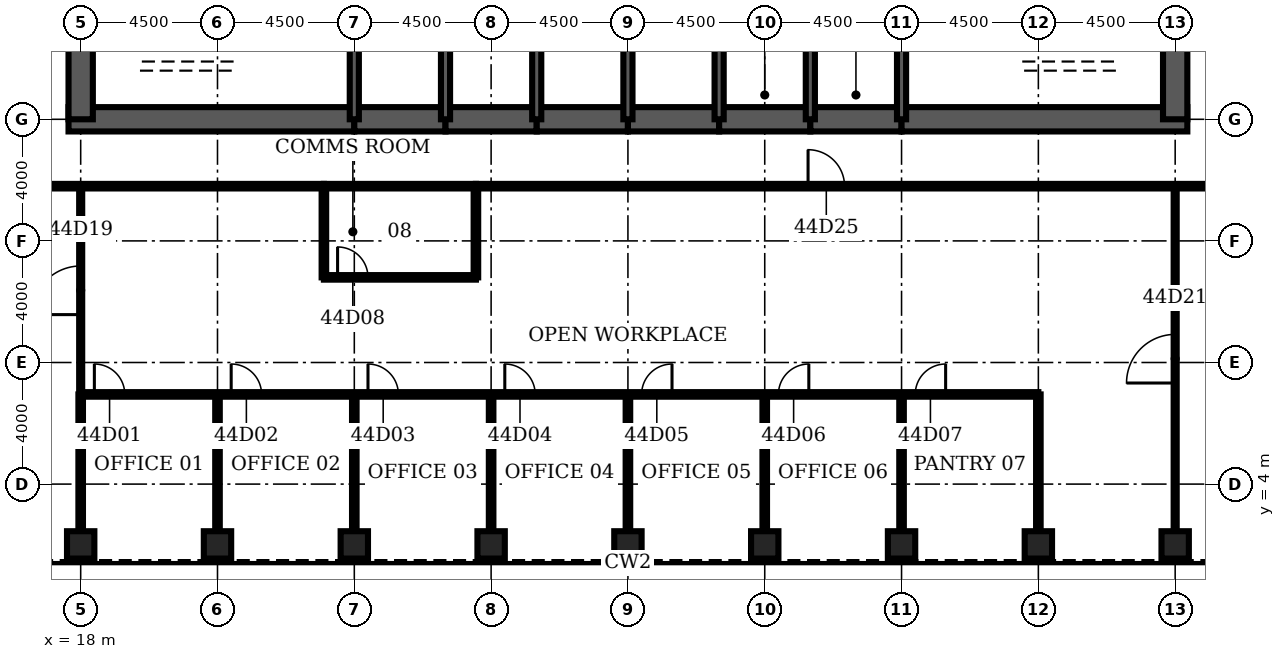
"""IFC4 building model, lengths in metres.
Left out: names, types, materials, properties, quantities, classifications, styles, units other than length and angle.
Written with IfcOpenShell. Run it as: python <this file> out.ifc"""

import sys

from ifc_helpers import new_model, si_unit, direction, frame, frame_2d, origin, origin_2d, place, context, subcontext, project, spatial, rectangle, hollow_rectangle, extrude, element, fill, save


model = new_model("IFC4")
c1 = context("Model", 3, precision=1e-05, world=origin(), true_north=direction((0.0, 1.0)))
c2 = subcontext(c1, "Body", "Model", "MODEL_VIEW")
j1 = project(units=[si_unit("LENGTHUNIT", "METRE"), si_unit("PLANEANGLEUNIT", "RADIAN")], contexts=[c1])
p1 = place(None, origin())
s1 = spatial("IfcSite", under=j1, at=p1, CompositionType="ELEMENT")
p2 = place(p1, origin())
s2 = spatial("IfcBuilding", under=s1, at=p2, CompositionType="ELEMENT")
p3 = place(p2, frame((0.0, 0.0, 198.4)))
s3 = spatial("IfcBuildingStorey", under=s2, at=p3, CompositionType="ELEMENT", Elevation=198.4)
for number, where, z_axis, x_axis in (
    (1, (18.0, 2.0, 0.0), (0.0, 0.0, 1.0), (0.0, 1.0, 0.0)),
    (2, (22.5, 2.0, 0.0), (0.0, 0.0, 1.0), (0.0, 1.0, 0.0)),
    (3, (27.0, 2.0, 0.0), (0.0, 0.0, 1.0), (0.0, 1.0, 0.0)),
    (4, (31.5, 2.0, 0.0), (0.0, 0.0, 1.0), (0.0, 1.0, 0.0)),
    (5, (36.0, 2.0, 0.0), (0.0, 0.0, 1.0), (0.0, 1.0, 0.0)),
    (6, (40.5, 2.0, 0.0), (0.0, 0.0, 1.0), (0.0, 1.0, 0.0)),
    (7, (45.0, 2.0, 0.0), (0.0, 0.0, 1.0), (0.0, 1.0, 0.0)),
    (8, (49.5, 2.0, 0.0), (0.0, 0.0, 1.0), (0.0, 1.0, 0.0)),
    (9, (54.0, 2.0, 0.0), (0.0, 0.0, 1.0), (0.0, 1.0, 0.0)),
):
    element("IfcColumn", number, at=place(p3, frame(where, z_axis=z_axis, x_axis=x_axis)), inside=s3, PredefinedType="COLUMN", context=c2, shape_type="SweptSolid", body=[
        extrude(hollow_rectangle(XDim=0.9, YDim=0.9, WallThickness=0.09, at=origin_2d()), origin(), (0.0, 0.0, 1.0), 4.2),
    ])
p4 = place(p3, frame((17.6, 16.0, 0.0), z_axis=(0.0, 0.0, 1.0), x_axis=(1.0, 0.0, 0.0)))
e10 = element("IfcWall", 10, at=p4, inside=s3, PredefinedType="SHEAR", context=c2, shape_type="SweptSolid", body=[
    extrude(rectangle(XDim=9.4, YDim=0.8, at=frame_2d((4.7, 0.0))), origin(), (0.0, 0.0, 1.0), 4.2),
])
for number, where, z_axis, x_axis in (
    (11, (27.0, 16.0, 0.0), (0.0, 0.0, 1.0), (1.0, 0.0, 0.0)),
    (12, (30.0, 16.0, 0.0), (0.0, 0.0, 1.0), (1.0, 0.0, 0.0)),
    (13, (33.0, 16.0, 0.0), (0.0, 0.0, 1.0), (1.0, 0.0, 0.0)),
    (14, (36.0, 16.0, 0.0), (0.0, 0.0, 1.0), (1.0, 0.0, 0.0)),
    (15, (39.0, 16.0, 0.0), (0.0, 0.0, 1.0), (1.0, 0.0, 0.0)),
    (16, (42.0, 16.0, 0.0), (0.0, 0.0, 1.0), (1.0, 0.0, 0.0)),
):
    element("IfcWall", number, at=place(p3, frame(where, z_axis=z_axis, x_axis=x_axis)), inside=s3, PredefinedType="SHEAR", context=c2, shape_type="SweptSolid", body=[
        extrude(rectangle(XDim=3.0, YDim=0.8, at=frame_2d((1.5, 0.0))), origin(), (0.0, 0.0, 1.0), 4.2),
    ])
p5 = place(p3, frame((45.0, 16.0, 0.0), z_axis=(0.0, 0.0, 1.0), x_axis=(1.0, 0.0, 0.0)))
e17 = element("IfcWall", 17, at=p5, inside=s3, PredefinedType="SHEAR", context=c2, shape_type="SweptSolid", body=[
    extrude(rectangle(XDim=9.4, YDim=0.8, at=frame_2d((4.7, 0.0))), origin(), (0.0, 0.0, 1.0), 4.2),
])
for number, where, z_axis, x_axis in (
    (18, (18.0, 19.2, 0.0), (0.0, 0.0, 1.0), (0.0, -1.0, 0.0)),
    (19, (54.0, 16.0, 0.0), (0.0, 0.0, 1.0), (0.0, 1.0, 0.0)),
):
    element("IfcWall", number, at=place(p3, frame(where, z_axis=z_axis, x_axis=x_axis)), inside=s3, PredefinedType="SHEAR", context=c2, shape_type="SweptSolid", body=[
        extrude(rectangle(XDim=3.2, YDim=0.8, at=frame_2d((1.6, 0.0))), origin(), (0.0, 0.0, 1.0), 4.2),
    ])
for number, where, z_axis, x_axis in (
    (20, (27.0, 16.0, 0.0), (0.0, 0.0, 1.0), (0.0, 1.0, 0.0)),
    (21, (30.0, 16.0, 0.0), (0.0, 0.0, 1.0), (0.0, 1.0, 0.0)),
    (22, (33.0, 16.0, 0.0), (0.0, 0.0, 1.0), (0.0, 1.0, 0.0)),
    (23, (36.0, 16.0, 0.0), (0.0, 0.0, 1.0), (0.0, 1.0, 0.0)),
    (24, (39.0, 16.0, 0.0), (0.0, 0.0, 1.0), (0.0, 1.0, 0.0)),
    (25, (42.0, 16.0, 0.0), (0.0, 0.0, 1.0), (0.0, 1.0, 0.0)),
    (26, (45.0, 16.0, 0.0), (0.0, 0.0, 1.0), (0.0, 1.0, 0.0)),
):
    element("IfcWall", number, at=place(p3, frame(where, z_axis=z_axis, x_axis=x_axis)), inside=s3, PredefinedType="SOLIDWALL", context=c2, shape_type="SweptSolid", body=[
        extrude(rectangle(XDim=3.2, YDim=0.3, at=frame_2d((1.6, 0.0))), origin(), (0.0, 0.0, 1.0), 4.2),
    ])
p6 = place(p3, frame((39.15, 17.35, 0.0), z_axis=(0.0, 0.0, 1.0), x_axis=(1.0, 0.0, 0.0)))
e27 = element("IfcWall", 27, at=p6, inside=s3, PredefinedType="SOLIDWALL", context=c2, shape_type="SweptSolid", body=[
    extrude(rectangle(XDim=2.7, YDim=0.3, at=frame_2d((1.35, 0.0))), origin(), (0.0, 0.0, 1.0), 4.04),
])
p7 = place(p6, frame((0.85, 0.0, 0.0)))
e28 = element("IfcOpeningElement", 28, at=p7, cuts=e27, PredefinedType="OPENING", context=c2, shape_type="SweptSolid", body=[
    extrude(rectangle(XDim=1.0, YDim=2.1, at=frame_2d((0.5, 1.05))), frame((0.0, 0.16, 0.0), z_axis=(0.0, -1.0, 0.0), x_axis=(1.0, 0.0, 0.0)), (0.0, 0.0, 1.0), 0.32),
])
p8 = place(p3, frame((42.15, 17.35, 0.0), z_axis=(0.0, 0.0, 1.0), x_axis=(1.0, 0.0, 0.0)))
e29 = element("IfcWall", 29, at=p8, inside=s3, PredefinedType="SOLIDWALL", context=c2, shape_type="SweptSolid", body=[
    extrude(rectangle(XDim=2.7, YDim=0.3, at=frame_2d((1.35, 0.0))), origin(), (0.0, 0.0, 1.0), 4.04),
])
p9 = place(p8, frame((0.85, 0.0, 0.0)))
e30 = element("IfcOpeningElement", 30, at=p9, cuts=e29, PredefinedType="OPENING", context=c2, shape_type="SweptSolid", body=[
    extrude(rectangle(XDim=1.0, YDim=2.1, at=frame_2d((0.5, 1.05))), frame((0.0, 0.16, 0.0), z_axis=(0.0, -1.0, 0.0), x_axis=(1.0, 0.0, 0.0)), (0.0, 0.0, 1.0), 0.32),
])
p10 = place(p3, frame((18.0, 6.95, 0.0), z_axis=(0.0, 0.0, 1.0), x_axis=(1.0, 0.0, 0.0)))
e31 = element("IfcWall", 31, at=p10, inside=s3, PredefinedType="PARTITIONING", context=c2, shape_type="SweptSolid", body=[
    extrude(rectangle(XDim=31.5, YDim=0.15, at=frame_2d((15.75, 0.0))), origin(), (0.0, 0.0, 1.0), 3.0),
])
p11 = place(p10, frame((0.45, 0.0, 0.0)))
e32 = element("IfcOpeningElement", 32, at=p11, cuts=e31, PredefinedType="OPENING", context=c2, shape_type="SweptSolid", body=[
    extrude(rectangle(XDim=1.0, YDim=2.1, at=frame_2d((0.5, 1.05))), frame((0.0, 0.085, 0.0), z_axis=(0.0, -1.0, 0.0), x_axis=(1.0, 0.0, 0.0)), (0.0, 0.0, 1.0), 0.17),
])
p12 = place(p10, frame((4.95, 0.0, 0.0)))
e33 = element("IfcOpeningElement", 33, at=p12, cuts=e31, PredefinedType="OPENING", context=c2, shape_type="SweptSolid", body=[
    extrude(rectangle(XDim=1.0, YDim=2.1, at=frame_2d((0.5, 1.05))), frame((0.0, 0.085, 0.0), z_axis=(0.0, -1.0, 0.0), x_axis=(1.0, 0.0, 0.0)), (0.0, 0.0, 1.0), 0.17),
])
p13 = place(p10, frame((9.45, 0.0, 0.0)))
e34 = element("IfcOpeningElement", 34, at=p13, cuts=e31, PredefinedType="OPENING", context=c2, shape_type="SweptSolid", body=[
    extrude(rectangle(XDim=1.0, YDim=2.1, at=frame_2d((0.5, 1.05))), frame((0.0, 0.085, 0.0), z_axis=(0.0, -1.0, 0.0), x_axis=(1.0, 0.0, 0.0)), (0.0, 0.0, 1.0), 0.17),
])
p14 = place(p10, frame((13.95, 0.0, 0.0)))
e35 = element("IfcOpeningElement", 35, at=p14, cuts=e31, PredefinedType="OPENING", context=c2, shape_type="SweptSolid", body=[
    extrude(rectangle(XDim=1.0, YDim=2.1, at=frame_2d((0.5, 1.05))), frame((0.0, 0.085, 0.0), z_axis=(0.0, -1.0, 0.0), x_axis=(1.0, 0.0, 0.0)), (0.0, 0.0, 1.0), 0.17),
])
p15 = place(p10, frame((18.45, 0.0, 0.0)))
e36 = element("IfcOpeningElement", 36, at=p15, cuts=e31, PredefinedType="OPENING", context=c2, shape_type="SweptSolid", body=[
    extrude(rectangle(XDim=1.0, YDim=2.1, at=frame_2d((0.5, 1.05))), frame((0.0, 0.085, 0.0), z_axis=(0.0, -1.0, 0.0), x_axis=(1.0, 0.0, 0.0)), (0.0, 0.0, 1.0), 0.17),
])
p16 = place(p10, frame((22.95, 0.0, 0.0)))
e37 = element("IfcOpeningElement", 37, at=p16, cuts=e31, PredefinedType="OPENING", context=c2, shape_type="SweptSolid", body=[
    extrude(rectangle(XDim=1.0, YDim=2.1, at=frame_2d((0.5, 1.05))), frame((0.0, 0.085, 0.0), z_axis=(0.0, -1.0, 0.0), x_axis=(1.0, 0.0, 0.0)), (0.0, 0.0, 1.0), 0.17),
])
p17 = place(p10, frame((27.45, 0.0, 0.0)))
e38 = element("IfcOpeningElement", 38, at=p17, cuts=e31, PredefinedType="OPENING", context=c2, shape_type="SweptSolid", body=[
    extrude(rectangle(XDim=1.0, YDim=2.1, at=frame_2d((0.5, 1.05))), frame((0.0, 0.085, 0.0), z_axis=(0.0, -1.0, 0.0), x_axis=(1.0, 0.0, 0.0)), (0.0, 0.0, 1.0), 0.17),
])
p18 = place(p3, frame((26.0, 10.8, 0.0), z_axis=(0.0, 0.0, 1.0), x_axis=(1.0, 0.0, 0.0)))
e39 = element("IfcWall", 39, at=p18, inside=s3, PredefinedType="PARTITIONING", context=c2, shape_type="SweptSolid", body=[
    extrude(rectangle(XDim=5.0, YDim=0.15, at=frame_2d((2.5, 0.0))), origin(), (0.0, 0.0, 1.0), 3.0),
])
p19 = place(p18, frame((0.45, 0.0, 0.0)))
e40 = element("IfcOpeningElement", 40, at=p19, cuts=e39, PredefinedType="OPENING", context=c2, shape_type="SweptSolid", body=[
    extrude(rectangle(XDim=1.0, YDim=2.1, at=frame_2d((0.5, 1.05))), frame((0.0, 0.085, 0.0), z_axis=(0.0, -1.0, 0.0), x_axis=(1.0, 0.0, 0.0)), (0.0, 0.0, 1.0), 0.17),
])
p20 = place(p3, frame((15.2, 13.8, 0.0), z_axis=(0.0, 0.0, 1.0), x_axis=(1.0, 0.0, 0.0)))
e41 = element("IfcWall", 41, at=p20, inside=s3, PredefinedType="PARTITIONING", context=c2, shape_type="SweptSolid", body=[
    extrude(rectangle(XDim=10.8, YDim=0.15, at=frame_2d((5.4, 0.0))), origin(), (0.0, 0.0, 1.0), 3.0),
])
p21 = place(p3, frame((26.0, 13.8, 0.0), z_axis=(0.0, 0.0, 1.0), x_axis=(1.0, 0.0, 0.0)))
e42 = element("IfcWall", 42, at=p21, inside=s3, PredefinedType="PARTITIONING", context=c2, shape_type="SweptSolid", body=[
    extrude(rectangle(XDim=5.0, YDim=0.15, at=frame_2d((2.5, 0.0))), origin(), (0.0, 0.0, 1.0), 3.0),
])
p22 = place(p3, frame((31.0, 13.8, 0.0), z_axis=(0.0, 0.0, 1.0), x_axis=(1.0, 0.0, 0.0)))
e43 = element("IfcWall", 43, at=p22, inside=s3, PredefinedType="PARTITIONING", context=c2, shape_type="SweptSolid", body=[
    extrude(rectangle(XDim=25.8, YDim=0.15, at=frame_2d((12.9, 0.0))), origin(), (0.0, 0.0, 1.0), 3.0),
])
p23 = place(p22, frame((10.925, 0.0, 0.0)))
e44 = element("IfcOpeningElement", 44, at=p23, cuts=e43, PredefinedType="OPENING", context=c2, shape_type="SweptSolid", body=[
    extrude(rectangle(XDim=1.2, YDim=2.1, at=frame_2d((0.6, 1.05))), frame((0.0, 0.085, 0.0), z_axis=(0.0, -1.0, 0.0), x_axis=(1.0, 0.0, 0.0)), (0.0, 0.0, 1.0), 0.17),
])
p24 = place(p3, frame((18.0, 2.45, 0.0), z_axis=(0.0, 0.0, 1.0), x_axis=(0.0, 1.0, 0.0)))
e45 = element("IfcWall", 45, at=p24, inside=s3, PredefinedType="PARTITIONING", context=c2, shape_type="SweptSolid", body=[
    extrude(rectangle(XDim=4.5, YDim=0.15, at=frame_2d((2.25, 0.0))), origin(), (0.0, 0.0, 1.0), 3.0),
])
p25 = place(p3, frame((18.0, 6.95, 0.0), z_axis=(0.0, 0.0, 1.0), x_axis=(0.0, 1.0, 0.0)))
e46 = element("IfcWall", 46, at=p25, inside=s3, PredefinedType="PARTITIONING", context=c2, shape_type="SweptSolid", body=[
    extrude(rectangle(XDim=6.85, YDim=0.1, at=frame_2d((3.425, 0.0))), origin(), (0.0, 0.0, 1.0), 3.0),
])
p26 = place(p25, frame((2.625, 0.0, 0.0)))
e47 = element("IfcOpeningElement", 47, at=p26, cuts=e46, PredefinedType="OPENING", context=c2, shape_type="SweptSolid", body=[
    extrude(rectangle(XDim=1.6, YDim=2.1, at=frame_2d((0.8, 1.05))), frame((0.0, 0.06, 0.0), z_axis=(0.0, -1.0, 0.0), x_axis=(1.0, 0.0, 0.0)), (0.0, 0.0, 1.0), 0.12),
])
p27 = place(p3, frame((22.5, 2.45, 0.0), z_axis=(0.0, 0.0, 1.0), x_axis=(0.0, 1.0, 0.0)))
e48 = element("IfcWall", 48, at=p27, inside=s3, PredefinedType="PARTITIONING", context=c2, shape_type="SweptSolid", body=[
    extrude(rectangle(XDim=4.5, YDim=0.15, at=frame_2d((2.25, 0.0))), origin(), (0.0, 0.0, 1.0), 3.0),
])
p28 = place(p3, frame((26.0, 10.8, 0.0), z_axis=(0.0, 0.0, 1.0), x_axis=(0.0, 1.0, 0.0)))
e49 = element("IfcWall", 49, at=p28, inside=s3, PredefinedType="PARTITIONING", context=c2, shape_type="SweptSolid", body=[
    extrude(rectangle(XDim=3.0, YDim=0.15, at=frame_2d((1.5, 0.0))), origin(), (0.0, 0.0, 1.0), 3.0),
])
p29 = place(p3, frame((27.0, 2.45, 0.0), z_axis=(0.0, 0.0, 1.0), x_axis=(0.0, 1.0, 0.0)))
e50 = element("IfcWall", 50, at=p29, inside=s3, PredefinedType="PARTITIONING", context=c2, shape_type="SweptSolid", body=[
    extrude(rectangle(XDim=4.5, YDim=0.15, at=frame_2d((2.25, 0.0))), origin(), (0.0, 0.0, 1.0), 3.0),
])
p30 = place(p3, frame((31.0, 10.8, 0.0), z_axis=(0.0, 0.0, 1.0), x_axis=(0.0, 1.0, 0.0)))
e51 = element("IfcWall", 51, at=p30, inside=s3, PredefinedType="PARTITIONING", context=c2, shape_type="SweptSolid", body=[
    extrude(rectangle(XDim=3.0, YDim=0.15, at=frame_2d((1.5, 0.0))), origin(), (0.0, 0.0, 1.0), 3.0),
])
for number, where, z_axis, x_axis in (
    (52, (31.5, 2.45, 0.0), (0.0, 0.0, 1.0), (0.0, 1.0, 0.0)),
    (53, (36.0, 2.45, 0.0), (0.0, 0.0, 1.0), (0.0, 1.0, 0.0)),
    (54, (40.5, 2.45, 0.0), (0.0, 0.0, 1.0), (0.0, 1.0, 0.0)),
    (55, (45.0, 2.45, 0.0), (0.0, 0.0, 1.0), (0.0, 1.0, 0.0)),
    (56, (49.5, 2.45, 0.0), (0.0, 0.0, 1.0), (0.0, 1.0, 0.0)),
):
    element("IfcWall", number, at=place(p3, frame(where, z_axis=z_axis, x_axis=x_axis)), inside=s3, PredefinedType="PARTITIONING", context=c2, shape_type="SweptSolid", body=[
        extrude(rectangle(XDim=4.5, YDim=0.15, at=frame_2d((2.25, 0.0))), origin(), (0.0, 0.0, 1.0), 3.0),
    ])
p31 = place(p3, frame((54.0, 2.45, 0.0), z_axis=(0.0, 0.0, 1.0), x_axis=(0.0, 1.0, 0.0)))
e57 = element("IfcWall", 57, at=p31, inside=s3, PredefinedType="PARTITIONING", context=c2, shape_type="SweptSolid", body=[
    extrude(rectangle(XDim=11.35, YDim=0.1, at=frame_2d((5.675, 0.0))), origin(), (0.0, 0.0, 1.0), 3.0),
])
p32 = place(p31, frame((4.875, 0.0, 0.0)))
e58 = element("IfcOpeningElement", 58, at=p32, cuts=e57, PredefinedType="OPENING", context=c2, shape_type="SweptSolid", body=[
    extrude(rectangle(XDim=1.6, YDim=2.1, at=frame_2d((0.8, 1.05))), frame((0.0, 0.06, 0.0), z_axis=(0.0, -1.0, 0.0), x_axis=(1.0, 0.0, 0.0)), (0.0, 0.0, 1.0), 0.12),
])
p33 = place(p7, origin())
e59 = element("IfcDoor", 59, at=p33, inside=s3, OperationType="SINGLE_SWING_LEFT", PredefinedType="DOOR", context=c2, shape_type="SweptSolid", body=[
    extrude(rectangle(XDim=1.0, YDim=2.1, at=frame_2d((0.5, 1.05))), frame((0.0, 0.025, 0.0), z_axis=(0.0, -1.0, 0.0), x_axis=(1.0, 0.0, 0.0)), (0.0, 0.0, 1.0), 0.05),
])
fill(e28, e59)
p34 = place(p9, origin())
e60 = element("IfcDoor", 60, at=p34, inside=s3, OperationType="SINGLE_SWING_LEFT", PredefinedType="DOOR", context=c2, shape_type="SweptSolid", body=[
    extrude(rectangle(XDim=1.0, YDim=2.1, at=frame_2d((0.5, 1.05))), frame((0.0, 0.025, 0.0), z_axis=(0.0, -1.0, 0.0), x_axis=(1.0, 0.0, 0.0)), (0.0, 0.0, 1.0), 0.05),
])
fill(e30, e60)
p35 = place(p11, origin())
e61 = element("IfcDoor", 61, at=p35, inside=s3, OperationType="SINGLE_SWING_LEFT", PredefinedType="DOOR", context=c2, shape_type="SweptSolid", body=[
    extrude(rectangle(XDim=1.0, YDim=2.1, at=frame_2d((0.5, 1.05))), frame((0.0, 0.025, 0.0), z_axis=(0.0, -1.0, 0.0), x_axis=(1.0, 0.0, 0.0)), (0.0, 0.0, 1.0), 0.05),
])
fill(e32, e61)
p36 = place(p12, origin())
e62 = element("IfcDoor", 62, at=p36, inside=s3, OperationType="SINGLE_SWING_LEFT", PredefinedType="DOOR", context=c2, shape_type="SweptSolid", body=[
    extrude(rectangle(XDim=1.0, YDim=2.1, at=frame_2d((0.5, 1.05))), frame((0.0, 0.025, 0.0), z_axis=(0.0, -1.0, 0.0), x_axis=(1.0, 0.0, 0.0)), (0.0, 0.0, 1.0), 0.05),
])
fill(e33, e62)
p37 = place(p13, origin())
e63 = element("IfcDoor", 63, at=p37, inside=s3, OperationType="SINGLE_SWING_LEFT", PredefinedType="DOOR", context=c2, shape_type="SweptSolid", body=[
    extrude(rectangle(XDim=1.0, YDim=2.1, at=frame_2d((0.5, 1.05))), frame((0.0, 0.025, 0.0), z_axis=(0.0, -1.0, 0.0), x_axis=(1.0, 0.0, 0.0)), (0.0, 0.0, 1.0), 0.05),
])
fill(e34, e63)
p38 = place(p14, origin())
e64 = element("IfcDoor", 64, at=p38, inside=s3, OperationType="SINGLE_SWING_LEFT", PredefinedType="DOOR", context=c2, shape_type="SweptSolid", body=[
    extrude(rectangle(XDim=1.0, YDim=2.1, at=frame_2d((0.5, 1.05))), frame((0.0, 0.025, 0.0), z_axis=(0.0, -1.0, 0.0), x_axis=(1.0, 0.0, 0.0)), (0.0, 0.0, 1.0), 0.05),
])
fill(e35, e64)
p39 = place(p15, origin())
e65 = element("IfcDoor", 65, at=p39, inside=s3, OperationType="SINGLE_SWING_RIGHT", PredefinedType="DOOR", context=c2, shape_type="SweptSolid", body=[
    extrude(rectangle(XDim=1.0, YDim=2.1, at=frame_2d((0.5, 1.05))), frame((0.0, 0.025, 0.0), z_axis=(0.0, -1.0, 0.0), x_axis=(1.0, 0.0, 0.0)), (0.0, 0.0, 1.0), 0.05),
])
fill(e36, e65)
p40 = place(p16, origin())
e66 = element("IfcDoor", 66, at=p40, inside=s3, OperationType="SINGLE_SWING_RIGHT", PredefinedType="DOOR", context=c2, shape_type="SweptSolid", body=[
    extrude(rectangle(XDim=1.0, YDim=2.1, at=frame_2d((0.5, 1.05))), frame((0.0, 0.025, 0.0), z_axis=(0.0, -1.0, 0.0), x_axis=(1.0, 0.0, 0.0)), (0.0, 0.0, 1.0), 0.05),
])
fill(e37, e66)
p41 = place(p17, origin())
e67 = element("IfcDoor", 67, at=p41, inside=s3, OperationType="SINGLE_SWING_RIGHT", PredefinedType="DOOR", context=c2, shape_type="SweptSolid", body=[
    extrude(rectangle(XDim=1.0, YDim=2.1, at=frame_2d((0.5, 1.05))), frame((0.0, 0.025, 0.0), z_axis=(0.0, -1.0, 0.0), x_axis=(1.0, 0.0, 0.0)), (0.0, 0.0, 1.0), 0.05),
])
fill(e38, e67)
p42 = place(p19, origin())
e68 = element("IfcDoor", 68, at=p42, inside=s3, OperationType="SINGLE_SWING_LEFT", PredefinedType="DOOR", context=c2, shape_type="SweptSolid", body=[
    extrude(rectangle(XDim=1.0, YDim=2.1, at=frame_2d((0.5, 1.05))), frame((0.0, 0.025, 0.0), z_axis=(0.0, -1.0, 0.0), x_axis=(1.0, 0.0, 0.0)), (0.0, 0.0, 1.0), 0.05),
])
fill(e40, e68)
p43 = place(p26, origin())
e69 = element("IfcDoor", 69, at=p43, inside=s3, OperationType="SINGLE_SWING_LEFT", PredefinedType="DOOR", context=c2, shape_type="SweptSolid", body=[
    extrude(rectangle(XDim=1.6, YDim=2.1, at=frame_2d((0.8, 1.05))), frame((0.0, 0.025, 0.0), z_axis=(0.0, -1.0, 0.0), x_axis=(1.0, 0.0, 0.0)), (0.0, 0.0, 1.0), 0.05),
])
fill(e47, e69)
p44 = place(p32, origin())
e70 = element("IfcDoor", 70, at=p44, inside=s3, OperationType="SINGLE_SWING_LEFT", PredefinedType="DOOR", context=c2, shape_type="SweptSolid", body=[
    extrude(rectangle(XDim=1.6, YDim=2.1, at=frame_2d((0.8, 1.05))), frame((0.0, 0.025, 0.0), z_axis=(0.0, -1.0, 0.0), x_axis=(1.0, 0.0, 0.0)), (0.0, 0.0, 1.0), 0.05),
])
fill(e58, e70)
p45 = place(p23, origin())
e71 = element("IfcDoor", 71, at=p45, inside=s3, OperationType="SINGLE_SWING_LEFT", PredefinedType="DOOR", context=c2, shape_type="SweptSolid", body=[
    extrude(rectangle(XDim=1.2, YDim=2.1, at=frame_2d((0.6, 1.05))), frame((0.0, 0.025, 0.0), z_axis=(0.0, -1.0, 0.0), x_axis=(1.0, 0.0, 0.0)), (0.0, 0.0, 1.0), 0.05),
])
fill(e44, e71)
save(model, sys.argv[1])
